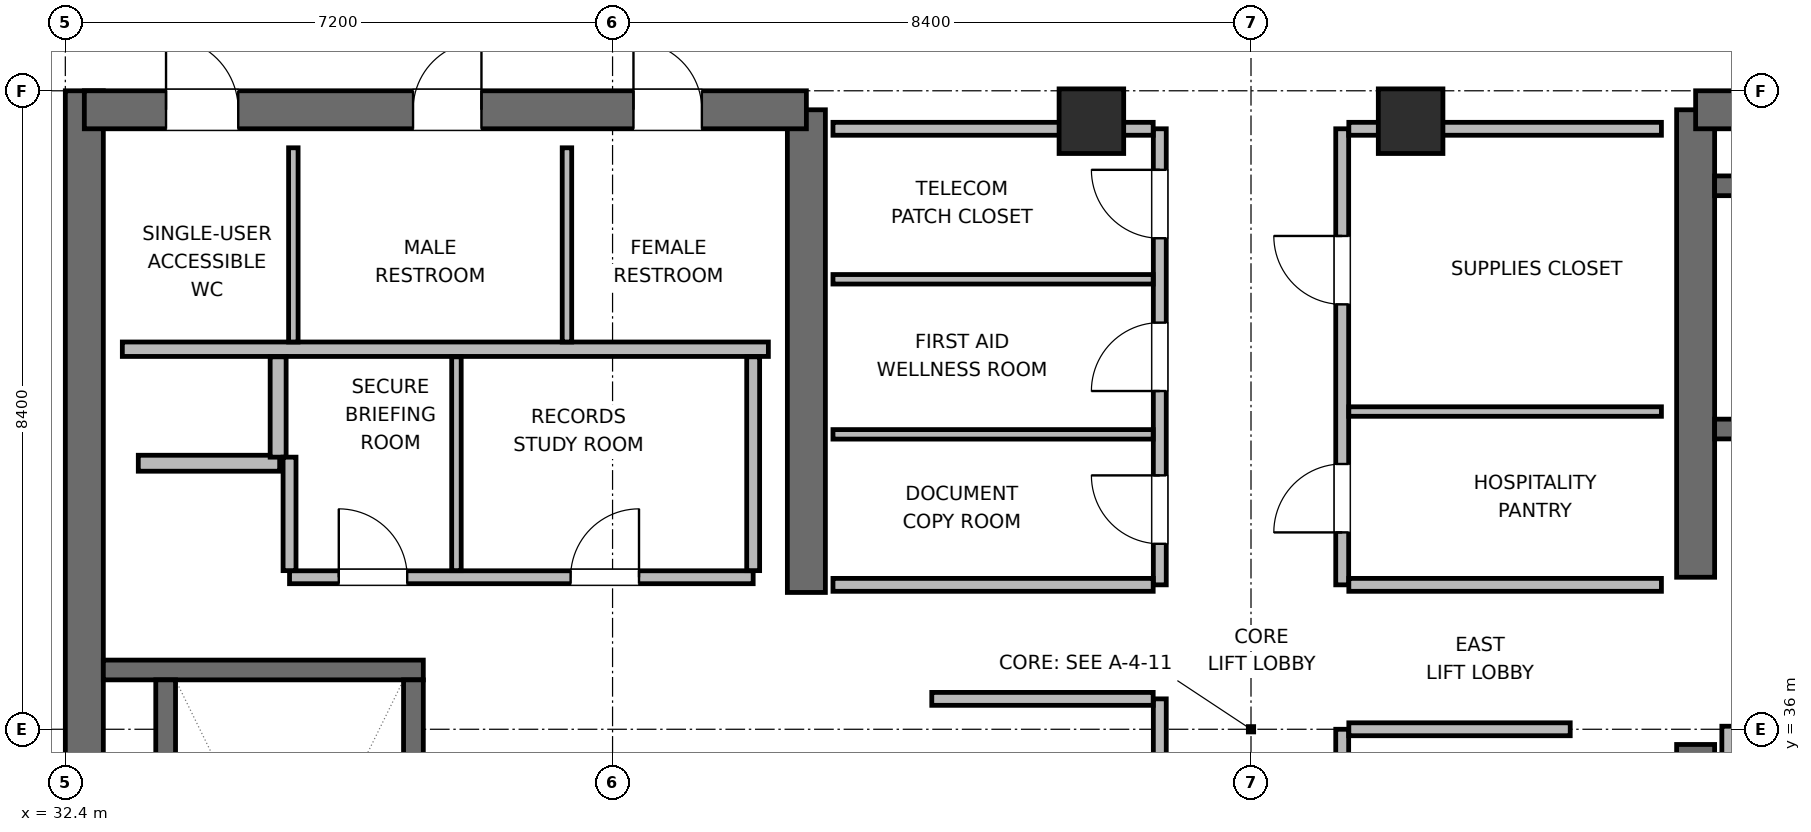
"""IFC4 building model, lengths in metres.
Left out: names, types, materials, properties, quantities, classifications, styles, units other than length and angle.
Written with IfcOpenShell. Run it as: python <this file> out.ifc"""

import sys

from ifc_helpers import new_model, si_unit, direction, frame, frame_2d, origin, origin_2d, place, context, subcontext, project, spatial, rectangle, extrude, element, fill, save


model = new_model("IFC4")
c1 = context("Model", 3, precision=1e-05, world=origin(), true_north=direction((0.0, 1.0)))
c2 = subcontext(c1, "Body", "Model", "MODEL_VIEW")
j1 = project(units=[si_unit("LENGTHUNIT", "METRE"), si_unit("PLANEANGLEUNIT", "RADIAN")], contexts=[c1])
p1 = place(None, origin())
s1 = spatial("IfcSite", under=j1, at=p1, CompositionType="ELEMENT")
p2 = place(p1, origin())
s2 = spatial("IfcBuilding", under=s1, at=p2, CompositionType="ELEMENT")
p3 = place(p2, frame((0.0, 0.0, 325.8)))
s3 = spatial("IfcBuildingStorey", under=s2, at=p3, CompositionType="ELEMENT", Elevation=325.8)
p4 = place(p3, frame((32.65, 27.6, 0.0), z_axis=(0.0, 0.0, 1.0), x_axis=(0.0, 1.0, 0.0)))
e1 = element("IfcWall", 1, at=p4, inside=s3, PredefinedType="SHEAR", context=c2, shape_type="SweptSolid", body=[
    extrude(rectangle(XDim=16.8, YDim=0.5, at=frame_2d((8.4, 0.0))), origin(), (0.0, 0.0, 1.0), 3.9),
])
p5 = place(p3, frame((42.15, 37.8, 0.0), z_axis=(0.0, 0.0, 1.0), x_axis=(0.0, 1.0, 0.0)))
e2 = element("IfcWall", 2, at=p5, inside=s3, PredefinedType="SHEAR", context=c2, shape_type="SweptSolid", body=[
    extrude(rectangle(XDim=6.35, YDim=0.5, at=frame_2d((3.175, 0.0))), origin(), (0.0, 0.0, 1.0), 3.9),
])
p6 = place(p3, frame((32.65, 44.15, 0.0), z_axis=(0.0, 0.0, 1.0), x_axis=(1.0, 0.0, 0.0)))
e3 = element("IfcWall", 3, at=p6, inside=s3, PredefinedType="SHEAR", context=c2, shape_type="SweptSolid", body=[
    extrude(rectangle(XDim=9.5, YDim=0.5, at=frame_2d((4.75, 0.0))), origin(), (0.0, 0.0, 1.0), 3.9),
])
p7 = place(p6, frame((1.075, 0.0, 0.0)))
e4 = element("IfcOpeningElement", 4, at=p7, cuts=e3, PredefinedType="OPENING", context=c2, shape_type="SweptSolid", body=[
    extrude(rectangle(XDim=0.95, YDim=2.04, at=frame_2d((0.475, 1.02))), frame((0.0, 0.26, 0.0), z_axis=(0.0, -1.0, 0.0), x_axis=(1.0, 0.0, 0.0)), (0.0, 0.0, 1.0), 0.52),
])
p8 = place(p6, frame((4.325, 0.0, 0.0)))
e5 = element("IfcOpeningElement", 5, at=p8, cuts=e3, PredefinedType="OPENING", context=c2, shape_type="SweptSolid", body=[
    extrude(rectangle(XDim=0.9, YDim=2.02, at=frame_2d((0.45, 1.01))), frame((0.0, 0.26, 0.0), z_axis=(0.0, -1.0, 0.0), x_axis=(1.0, 0.0, 0.0)), (0.0, 0.0, 1.0), 0.52),
])
p9 = place(p6, frame((7.225, 0.0, 0.0)))
e6 = element("IfcOpeningElement", 6, at=p9, cuts=e3, PredefinedType="OPENING", context=c2, shape_type="SweptSolid", body=[
    extrude(rectangle(XDim=0.9, YDim=2.02, at=frame_2d((0.45, 1.01))), frame((0.0, 0.26, 0.0), z_axis=(0.0, -1.0, 0.0), x_axis=(1.0, 0.0, 0.0)), (0.0, 0.0, 1.0), 0.52),
])
p10 = place(p3, frame((53.85, 27.85, 0.0), z_axis=(0.0, 0.0, 1.0), x_axis=(0.0, 1.0, 0.0)))
e7 = element("IfcWall", 7, at=p10, inside=s3, PredefinedType="SHEAR", context=c2, shape_type="SweptSolid", body=[
    extrude(rectangle(XDim=7.95, YDim=0.5, at=frame_2d((3.975, 0.0))), origin(), (0.0, 0.0, 1.0), 3.9),
])
p11 = place(p3, frame((53.85, 38.0, 0.0), z_axis=(0.0, 0.0, 1.0), x_axis=(0.0, 1.0, 0.0)))
e8 = element("IfcWall", 8, at=p11, inside=s3, PredefinedType="SHEAR", context=c2, shape_type="SweptSolid", body=[
    extrude(rectangle(XDim=6.15, YDim=0.5, at=frame_2d((3.075, 0.0))), origin(), (0.0, 0.0, 1.0), 3.9),
])
p12 = place(p3, frame((53.85, 44.15, 0.0), z_axis=(0.0, 0.0, 1.0), x_axis=(1.0, 0.0, 0.0)))
e9 = element("IfcWall", 9, at=p12, inside=s3, PredefinedType="SHEAR", context=c2, shape_type="SweptSolid", body=[
    extrude(rectangle(XDim=9.5, YDim=0.5, at=frame_2d((4.75, 0.0))), origin(), (0.0, 0.0, 1.0), 3.9),
])
p13 = place(p3, frame((32.9, 36.78, 0.0), z_axis=(0.0, 0.0, 1.0), x_axis=(1.0, 0.0, 0.0)))
e10 = element("IfcWall", 10, at=p13, inside=s3, PredefinedType="SHEAR", context=c2, shape_type="SweptSolid", body=[
    extrude(rectangle(XDim=4.21, YDim=0.26, at=frame_2d((2.105, 0.0))), origin(), (0.0, 0.0, 1.0), 3.9),
])
p14 = place(p3, frame((33.72, 29.05, 0.0), z_axis=(0.0, 0.0, 1.0), x_axis=(0.0, 1.0, 0.0)))
e11 = element("IfcWall", 11, at=p14, inside=s3, PredefinedType="SHEAR", context=c2, shape_type="SweptSolid", body=[
    extrude(rectangle(XDim=7.6, YDim=0.26, at=frame_2d((3.8, 0.0))), origin(), (0.0, 0.0, 1.0), 3.9),
])
p15 = place(p3, frame((36.98, 29.05, 0.0), z_axis=(0.0, 0.0, 1.0), x_axis=(0.0, 1.0, 0.0)))
e12 = element("IfcWall", 12, at=p15, inside=s3, PredefinedType="SHEAR", context=c2, shape_type="SweptSolid", body=[
    extrude(rectangle(XDim=7.6, YDim=0.26, at=frame_2d((3.8, 0.0))), origin(), (0.0, 0.0, 1.0), 3.9),
])
p16 = place(p15, frame((0.3, 0.0, 0.0)))
e13 = element("IfcOpeningElement", 13, at=p16, cuts=e12, PredefinedType="OPENING", context=c2, shape_type="SweptSolid", body=[
    extrude(rectangle(XDim=1.0, YDim=2.04, at=frame_2d((0.5, 1.02))), frame((0.0, 0.14, 0.0), z_axis=(0.0, -1.0, 0.0), x_axis=(1.0, 0.0, 0.0)), (0.0, 0.0, 1.0), 0.28),
])
p17 = place(p3, frame((54.1, 39.95, 0.0), z_axis=(0.0, 0.0, 1.0), x_axis=(1.0, 0.0, 0.0)))
e14 = element("IfcWall", 14, at=p17, inside=s3, PredefinedType="SHEAR", context=c2, shape_type="SweptSolid", body=[
    extrude(rectangle(XDim=9.0, YDim=0.26, at=frame_2d((4.5, 0.0))), origin(), (0.0, 0.0, 1.0), 3.9),
])
p18 = place(p17, frame((1.1, 0.0, 0.0)))
e15 = element("IfcOpeningElement", 15, at=p18, cuts=e14, PredefinedType="OPENING", context=c2, shape_type="SweptSolid", body=[
    extrude(rectangle(XDim=1.0, YDim=2.04, at=frame_2d((0.5, 1.02))), frame((0.0, 0.14, 0.0), z_axis=(0.0, -1.0, 0.0), x_axis=(1.0, 0.0, 0.0)), (0.0, 0.0, 1.0), 0.28),
])
p19 = place(p3, frame((54.1, 43.15, 0.0), z_axis=(0.0, 0.0, 1.0), x_axis=(1.0, 0.0, 0.0)))
e16 = element("IfcWall", 16, at=p19, inside=s3, PredefinedType="SHEAR", context=c2, shape_type="SweptSolid", body=[
    extrude(rectangle(XDim=9.0, YDim=0.26, at=frame_2d((4.5, 0.0))), origin(), (0.0, 0.0, 1.0), 3.9),
])
for number, where, z_axis, x_axis in (
    (17, (45.9, 44.0, 0.0), (0.0, 0.0, 1.0), (1.0, 0.0, 0.0)),
    (18, (50.1, 44.0, 0.0), (0.0, 0.0, 1.0), (1.0, 0.0, 0.0)),
):
    element("IfcColumn", number, at=place(p3, frame(where, z_axis=z_axis, x_axis=x_axis)), inside=s3, PredefinedType="COLUMN", context=c2, shape_type="SweptSolid", body=[
        extrude(rectangle(XDim=0.85, YDim=0.85, at=origin_2d()), origin(), (0.0, 0.0, 1.0), 3.9),
    ])
p20 = place(p3, frame((33.15, 41.0, 0.0), z_axis=(0.0, 0.0, 1.0), x_axis=(1.0, 0.0, 0.0)))
e19 = element("IfcWall", 19, at=p20, inside=s3, PredefinedType="PLUMBINGWALL", context=c2, shape_type="SweptSolid", body=[
    extrude(rectangle(XDim=8.5, YDim=0.19, at=frame_2d((4.25, 0.0))), origin(), (0.0, 0.0, 1.0), 3.68),
])
for number, where, z_axis, x_axis in (
    (20, (35.4, 41.095, 0.0), (0.0, 0.0, 1.0), (0.0, 1.0, 0.0)),
    (21, (39.0, 41.095, 0.0), (0.0, 0.0, 1.0), (0.0, 1.0, 0.0)),
):
    element("IfcWall", number, at=place(p3, frame(where, z_axis=z_axis, x_axis=x_axis)), inside=s3, PredefinedType="PARTITIONING", context=c2, shape_type="SweptSolid", body=[
        extrude(rectangle(XDim=2.555, YDim=0.125, at=frame_2d((1.277, 0.0))), origin(), (0.0, 0.0, 1.0), 3.68),
    ])
p21 = place(p3, frame((33.36, 39.5, 0.0), z_axis=(0.0, 0.0, 1.0), x_axis=(1.0, 0.0, 0.0)))
e22 = element("IfcWall", 22, at=p21, inside=s3, PredefinedType="PARTITIONING", context=c2, shape_type="SweptSolid", body=[
    extrude(rectangle(XDim=1.86, YDim=0.21, at=frame_2d((0.93, 0.0))), origin(), (0.0, 0.0, 1.0), 3.68),
])
p22 = place(p3, frame((35.2, 39.58, 0.0), z_axis=(0.0, 0.0, 1.0), x_axis=(0.0, 1.0, 0.0)))
e23 = element("IfcWall", 23, at=p22, inside=s3, PredefinedType="PARTITIONING", context=c2, shape_type="SweptSolid", body=[
    extrude(rectangle(XDim=1.32, YDim=0.21, at=frame_2d((0.66, 0.0))), origin(), (0.0, 0.0, 1.0), 3.68),
])
p23 = place(p3, frame((54.3, 34.26, 0.0), z_axis=(0.0, 0.0, 1.0), x_axis=(0.0, 1.0, 0.0)))
e24 = element("IfcWall", 24, at=p23, inside=s3, PredefinedType="PARTITIONING", context=c2, shape_type="SweptSolid", body=[
    extrude(rectangle(XDim=1.78, YDim=0.21, at=frame_2d((0.89, 0.0))), origin(), (0.0, 0.0, 1.0), 3.68),
])
p24 = place(p3, frame((35.35, 38.0, 0.0), z_axis=(0.0, 0.0, 1.0), x_axis=(1.0, 0.0, 0.0)))
e25 = element("IfcWall", 25, at=p24, inside=s3, PredefinedType="PARTITIONING", context=c2, shape_type="SweptSolid", body=[
    extrude(rectangle(XDim=6.1, YDim=0.17, at=frame_2d((3.05, 0.0))), origin(), (0.0, 0.0, 1.0), 3.68),
])
p25 = place(p24, frame((0.648, 0.0, 0.0)))
e26 = element("IfcOpeningElement", 26, at=p25, cuts=e25, PredefinedType="OPENING", context=c2, shape_type="SweptSolid", body=[
    extrude(rectangle(XDim=0.9, YDim=2.02, at=frame_2d((0.45, 1.01))), frame((0.0, 0.095, 0.0), z_axis=(0.0, -1.0, 0.0), x_axis=(1.0, 0.0, 0.0)), (0.0, 0.0, 1.0), 0.19),
])
p26 = place(p24, frame((3.698, 0.0, 0.0)))
e27 = element("IfcOpeningElement", 27, at=p26, cuts=e25, PredefinedType="OPENING", context=c2, shape_type="SweptSolid", body=[
    extrude(rectangle(XDim=0.9, YDim=2.02, at=frame_2d((0.45, 1.01))), frame((0.0, 0.095, 0.0), z_axis=(0.0, -1.0, 0.0), x_axis=(1.0, 0.0, 0.0)), (0.0, 0.0, 1.0), 0.19),
])
p27 = place(p3, frame((35.35, 38.087, 0.0), z_axis=(0.0, 0.0, 1.0), x_axis=(0.0, 1.0, 0.0)))
e28 = element("IfcWall", 28, at=p27, inside=s3, PredefinedType="PARTITIONING", context=c2, shape_type="SweptSolid", body=[
    extrude(rectangle(XDim=1.493, YDim=0.17, at=frame_2d((0.747, 0.0))), origin(), (0.0, 0.0, 1.0), 3.68),
])
p28 = place(p3, frame((41.45, 38.087, 0.0), z_axis=(0.0, 0.0, 1.0), x_axis=(0.0, 1.0, 0.0)))
e29 = element("IfcWall", 29, at=p28, inside=s3, PredefinedType="PARTITIONING", context=c2, shape_type="SweptSolid", body=[
    extrude(rectangle(XDim=2.813, YDim=0.17, at=frame_2d((1.406, 0.0))), origin(), (0.0, 0.0, 1.0), 3.68),
])
p29 = place(p3, frame((37.546, 38.087, 0.0), z_axis=(0.0, 0.0, 1.0), x_axis=(0.0, 1.0, 0.0)))
e30 = element("IfcWall", 30, at=p29, inside=s3, PredefinedType="PARTITIONING", context=c2, shape_type="SweptSolid", body=[
    extrude(rectangle(XDim=2.813, YDim=0.125, at=frame_2d((1.406, 0.0))), origin(), (0.0, 0.0, 1.0), 3.68),
])
p30 = place(p3, frame((46.8, 32.6, 0.0), z_axis=(0.0, 0.0, 1.0), x_axis=(0.0, 1.0, 0.0)))
e31 = element("IfcWall", 31, at=p30, inside=s3, PredefinedType="PARTITIONING", context=c2, shape_type="SweptSolid", body=[
    extrude(rectangle(XDim=3.8, YDim=0.17, at=frame_2d((1.9, 0.0))), origin(), (0.0, 0.0, 1.0), 3.68),
])
p31 = place(p30, frame((0.272, 0.0, 0.0)))
e32 = element("IfcOpeningElement", 32, at=p31, cuts=e31, PredefinedType="OPENING", context=c2, shape_type="SweptSolid", body=[
    extrude(rectangle(XDim=0.9, YDim=2.02, at=frame_2d((0.45, 1.01))), frame((0.0, 0.095, 0.0), z_axis=(0.0, -1.0, 0.0), x_axis=(1.0, 0.0, 0.0)), (0.0, 0.0, 1.0), 0.19),
])
p32 = place(p30, frame((2.172, 0.0, 0.0)))
e33 = element("IfcOpeningElement", 33, at=p32, cuts=e31, PredefinedType="OPENING", context=c2, shape_type="SweptSolid", body=[
    extrude(rectangle(XDim=0.9, YDim=2.02, at=frame_2d((0.45, 1.01))), frame((0.0, 0.095, 0.0), z_axis=(0.0, -1.0, 0.0), x_axis=(1.0, 0.0, 0.0)), (0.0, 0.0, 1.0), 0.19),
])
p33 = place(p3, frame((43.8, 36.4, 0.0), z_axis=(0.0, 0.0, 1.0), x_axis=(1.0, 0.0, 0.0)))
e34 = element("IfcWall", 34, at=p33, inside=s3, PredefinedType="PARTITIONING", context=c2, shape_type="SweptSolid", body=[
    extrude(rectangle(XDim=2.913, YDim=0.17, at=frame_2d((1.457, 0.0))), origin(), (0.0, 0.0, 1.0), 3.68),
])
p34 = place(p3, frame((49.2, 32.6, 0.0), z_axis=(0.0, 0.0, 1.0), x_axis=(0.0, 1.0, 0.0)))
e35 = element("IfcWall", 35, at=p34, inside=s3, PredefinedType="PARTITIONING", context=c2, shape_type="SweptSolid", body=[
    extrude(rectangle(XDim=3.4, YDim=0.17, at=frame_2d((1.7, 0.0))), origin(), (0.0, 0.0, 1.0), 3.68),
])
p35 = place(p34, frame((0.638, 0.0, 0.0)))
e36 = element("IfcOpeningElement", 36, at=p35, cuts=e35, PredefinedType="OPENING", context=c2, shape_type="SweptSolid", body=[
    extrude(rectangle(XDim=0.9, YDim=2.02, at=frame_2d((0.45, 1.01))), frame((0.0, 0.095, 0.0), z_axis=(0.0, -1.0, 0.0), x_axis=(1.0, 0.0, 0.0)), (0.0, 0.0, 1.0), 0.19),
])
p36 = place(p3, frame((49.287, 36.0, 0.0), z_axis=(0.0, 0.0, 1.0), x_axis=(1.0, 0.0, 0.0)))
e37 = element("IfcWall", 37, at=p36, inside=s3, PredefinedType="PARTITIONING", context=c2, shape_type="SweptSolid", body=[
    extrude(rectangle(XDim=2.913, YDim=0.17, at=frame_2d((1.457, 0.0))), origin(), (0.0, 0.0, 1.0), 3.68),
])
p37 = place(p3, frame((46.8, 37.9, 0.0), z_axis=(0.0, 0.0, 1.0), x_axis=(0.0, 1.0, 0.0)))
e38 = element("IfcWall", 38, at=p37, inside=s3, PredefinedType="PARTITIONING", context=c2, shape_type="SweptSolid", body=[
    extrude(rectangle(XDim=6.0, YDim=0.17, at=frame_2d((3.0, 0.0))), origin(), (0.0, 0.0, 1.0), 3.68),
])
p38 = place(p37, frame((0.54, 0.0, 0.0)))
e39 = element("IfcOpeningElement", 39, at=p38, cuts=e38, PredefinedType="OPENING", context=c2, shape_type="SweptSolid", body=[
    extrude(rectangle(XDim=0.9, YDim=2.02, at=frame_2d((0.45, 1.01))), frame((0.0, 0.095, 0.0), z_axis=(0.0, -1.0, 0.0), x_axis=(1.0, 0.0, 0.0)), (0.0, 0.0, 1.0), 0.19),
])
p39 = place(p37, frame((2.55, 0.0, 0.0)))
e40 = element("IfcOpeningElement", 40, at=p39, cuts=e38, PredefinedType="OPENING", context=c2, shape_type="SweptSolid", body=[
    extrude(rectangle(XDim=0.9, YDim=2.02, at=frame_2d((0.45, 1.01))), frame((0.0, 0.095, 0.0), z_axis=(0.0, -1.0, 0.0), x_axis=(1.0, 0.0, 0.0)), (0.0, 0.0, 1.0), 0.19),
])
p40 = place(p37, frame((4.56, 0.0, 0.0)))
e41 = element("IfcOpeningElement", 41, at=p40, cuts=e38, PredefinedType="OPENING", context=c2, shape_type="SweptSolid", body=[
    extrude(rectangle(XDim=0.9, YDim=2.02, at=frame_2d((0.45, 1.01))), frame((0.0, 0.095, 0.0), z_axis=(0.0, -1.0, 0.0), x_axis=(1.0, 0.0, 0.0)), (0.0, 0.0, 1.0), 0.19),
])
p41 = place(p3, frame((42.5, 37.9, 0.0), z_axis=(0.0, 0.0, 1.0), x_axis=(1.0, 0.0, 0.0)))
e42 = element("IfcWall", 42, at=p41, inside=s3, PredefinedType="PARTITIONING", context=c2, shape_type="SweptSolid", body=[
    extrude(rectangle(XDim=4.213, YDim=0.17, at=frame_2d((2.106, 0.0))), origin(), (0.0, 0.0, 1.0), 3.68),
])
p42 = place(p3, frame((42.5, 43.9, 0.0), z_axis=(0.0, 0.0, 1.0), x_axis=(1.0, 0.0, 0.0)))
e43 = element("IfcWall", 43, at=p42, inside=s3, PredefinedType="PARTITIONING", context=c2, shape_type="SweptSolid", body=[
    extrude(rectangle(XDim=4.213, YDim=0.17, at=frame_2d((2.106, 0.0))), origin(), (0.0, 0.0, 1.0), 2.765),
])
for number, where, z_axis, x_axis in (
    (44, (42.5, 39.88, 0.0), (0.0, 0.0, 1.0), (1.0, 0.0, 0.0)),
    (45, (42.5, 41.92, 0.0), (0.0, 0.0, 1.0), (1.0, 0.0, 0.0)),
):
    element("IfcWall", number, at=place(p3, frame(where, z_axis=z_axis, x_axis=x_axis)), inside=s3, PredefinedType="PARTITIONING", context=c2, shape_type="SweptSolid", body=[
        extrude(rectangle(XDim=4.213, YDim=0.125, at=frame_2d((2.106, 0.0))), origin(), (0.0, 0.0, 1.0), 3.68),
    ])
p43 = place(p3, frame((49.2, 37.9, 0.0), z_axis=(0.0, 0.0, 1.0), x_axis=(0.0, 1.0, 0.0)))
e46 = element("IfcWall", 46, at=p43, inside=s3, PredefinedType="PARTITIONING", context=c2, shape_type="SweptSolid", body=[
    extrude(rectangle(XDim=6.0, YDim=0.17, at=frame_2d((3.0, 0.0))), origin(), (0.0, 0.0, 1.0), 3.68),
])
p44 = place(p43, frame((0.69, 0.0, 0.0)))
e47 = element("IfcOpeningElement", 47, at=p44, cuts=e46, PredefinedType="OPENING", context=c2, shape_type="SweptSolid", body=[
    extrude(rectangle(XDim=0.9, YDim=2.02, at=frame_2d((0.45, 1.01))), frame((0.0, 0.095, 0.0), z_axis=(0.0, -1.0, 0.0), x_axis=(1.0, 0.0, 0.0)), (0.0, 0.0, 1.0), 0.19),
])
p45 = place(p43, frame((3.69, 0.0, 0.0)))
e48 = element("IfcOpeningElement", 48, at=p45, cuts=e46, PredefinedType="OPENING", context=c2, shape_type="SweptSolid", body=[
    extrude(rectangle(XDim=0.9, YDim=2.02, at=frame_2d((0.45, 1.01))), frame((0.0, 0.095, 0.0), z_axis=(0.0, -1.0, 0.0), x_axis=(1.0, 0.0, 0.0)), (0.0, 0.0, 1.0), 0.19),
])
p46 = place(p3, frame((49.287, 37.9, 0.0), z_axis=(0.0, 0.0, 1.0), x_axis=(1.0, 0.0, 0.0)))
e49 = element("IfcWall", 49, at=p46, inside=s3, PredefinedType="PARTITIONING", context=c2, shape_type="SweptSolid", body=[
    extrude(rectangle(XDim=4.113, YDim=0.17, at=frame_2d((2.056, 0.0))), origin(), (0.0, 0.0, 1.0), 3.68),
])
p47 = place(p3, frame((49.287, 43.9, 0.0), z_axis=(0.0, 0.0, 1.0), x_axis=(1.0, 0.0, 0.0)))
e50 = element("IfcWall", 50, at=p47, inside=s3, PredefinedType="PARTITIONING", context=c2, shape_type="SweptSolid", body=[
    extrude(rectangle(XDim=4.113, YDim=0.17, at=frame_2d((2.056, 0.0))), origin(), (0.0, 0.0, 1.0), 2.765),
])
p48 = place(p3, frame((49.287, 40.18, 0.0), z_axis=(0.0, 0.0, 1.0), x_axis=(1.0, 0.0, 0.0)))
e51 = element("IfcWall", 51, at=p48, inside=s3, PredefinedType="PARTITIONING", context=c2, shape_type="SweptSolid", body=[
    extrude(rectangle(XDim=4.113, YDim=0.125, at=frame_2d((2.056, 0.0))), origin(), (0.0, 0.0, 1.0), 3.68),
])
p49 = place(p7, origin())
e52 = element("IfcDoor", 52, at=p49, inside=s3, OperationType="SINGLE_SWING_LEFT", PredefinedType="DOOR", context=c2, shape_type="SweptSolid", body=[
    extrude(rectangle(XDim=0.95, YDim=2.04, at=frame_2d((0.475, 1.02))), frame((0.0, 0.025, 0.0), z_axis=(0.0, -1.0, 0.0), x_axis=(1.0, 0.0, 0.0)), (0.0, 0.0, 1.0), 0.05),
])
fill(e4, e52)
p50 = place(p8, origin())
e53 = element("IfcDoor", 53, at=p50, inside=s3, OperationType="SINGLE_SWING_RIGHT", PredefinedType="DOOR", context=c2, shape_type="SweptSolid", body=[
    extrude(rectangle(XDim=0.9, YDim=2.02, at=frame_2d((0.45, 1.01))), frame((0.0, 0.025, 0.0), z_axis=(0.0, -1.0, 0.0), x_axis=(1.0, 0.0, 0.0)), (0.0, 0.0, 1.0), 0.05),
])
fill(e5, e53)
p51 = place(p9, origin())
e54 = element("IfcDoor", 54, at=p51, inside=s3, OperationType="SINGLE_SWING_LEFT", PredefinedType="DOOR", context=c2, shape_type="SweptSolid", body=[
    extrude(rectangle(XDim=0.9, YDim=2.02, at=frame_2d((0.45, 1.01))), frame((0.0, 0.025, 0.0), z_axis=(0.0, -1.0, 0.0), x_axis=(1.0, 0.0, 0.0)), (0.0, 0.0, 1.0), 0.05),
])
fill(e6, e54)
p52 = place(p25, origin())
e55 = element("IfcDoor", 55, at=p52, inside=s3, OperationType="SINGLE_SWING_LEFT", PredefinedType="DOOR", context=c2, shape_type="SweptSolid", body=[
    extrude(rectangle(XDim=0.9, YDim=2.02, at=frame_2d((0.45, 1.01))), frame((0.0, 0.025, 0.0), z_axis=(0.0, -1.0, 0.0), x_axis=(1.0, 0.0, 0.0)), (0.0, 0.0, 1.0), 0.05),
])
fill(e26, e55)
p53 = place(p26, origin())
e56 = element("IfcDoor", 56, at=p53, inside=s3, OperationType="SINGLE_SWING_RIGHT", PredefinedType="DOOR", context=c2, shape_type="SweptSolid", body=[
    extrude(rectangle(XDim=0.9, YDim=2.02, at=frame_2d((0.45, 1.01))), frame((0.0, 0.025, 0.0), z_axis=(0.0, -1.0, 0.0), x_axis=(1.0, 0.0, 0.0)), (0.0, 0.0, 1.0), 0.05),
])
fill(e27, e56)
p54 = place(p38, origin())
e57 = element("IfcDoor", 57, at=p54, inside=s3, OperationType="SINGLE_SWING_RIGHT", PredefinedType="DOOR", context=c2, shape_type="SweptSolid", body=[
    extrude(rectangle(XDim=0.9, YDim=2.02, at=frame_2d((0.45, 1.01))), frame((0.0, 0.025, 0.0), z_axis=(0.0, -1.0, 0.0), x_axis=(1.0, 0.0, 0.0)), (0.0, 0.0, 1.0), 0.05),
])
fill(e39, e57)
p55 = place(p39, origin())
e58 = element("IfcDoor", 58, at=p55, inside=s3, OperationType="SINGLE_SWING_LEFT", PredefinedType="DOOR", context=c2, shape_type="SweptSolid", body=[
    extrude(rectangle(XDim=0.9, YDim=2.02, at=frame_2d((0.45, 1.01))), frame((0.0, 0.025, 0.0), z_axis=(0.0, -1.0, 0.0), x_axis=(1.0, 0.0, 0.0)), (0.0, 0.0, 1.0), 0.05),
])
fill(e40, e58)
p56 = place(p40, origin())
e59 = element("IfcDoor", 59, at=p56, inside=s3, OperationType="SINGLE_SWING_RIGHT", PredefinedType="DOOR", context=c2, shape_type="SweptSolid", body=[
    extrude(rectangle(XDim=0.9, YDim=2.02, at=frame_2d((0.45, 1.01))), frame((0.0, 0.025, 0.0), z_axis=(0.0, -1.0, 0.0), x_axis=(1.0, 0.0, 0.0)), (0.0, 0.0, 1.0), 0.05),
])
fill(e41, e59)
p57 = place(p44, origin())
e60 = element("IfcDoor", 60, at=p57, inside=s3, OperationType="SINGLE_SWING_LEFT", PredefinedType="DOOR", context=c2, shape_type="SweptSolid", body=[
    extrude(rectangle(XDim=0.9, YDim=2.02, at=frame_2d((0.45, 1.01))), frame((0.0, 0.025, 0.0), z_axis=(0.0, -1.0, 0.0), x_axis=(1.0, 0.0, 0.0)), (0.0, 0.0, 1.0), 0.05),
])
fill(e47, e60)
p58 = place(p45, origin())
e61 = element("IfcDoor", 61, at=p58, inside=s3, OperationType="SINGLE_SWING_RIGHT", PredefinedType="DOOR", context=c2, shape_type="SweptSolid", body=[
    extrude(rectangle(XDim=0.9, YDim=2.02, at=frame_2d((0.45, 1.01))), frame((0.0, 0.025, 0.0), z_axis=(0.0, -1.0, 0.0), x_axis=(1.0, 0.0, 0.0)), (0.0, 0.0, 1.0), 0.05),
])
fill(e48, e61)
save(model, sys.argv[1])
